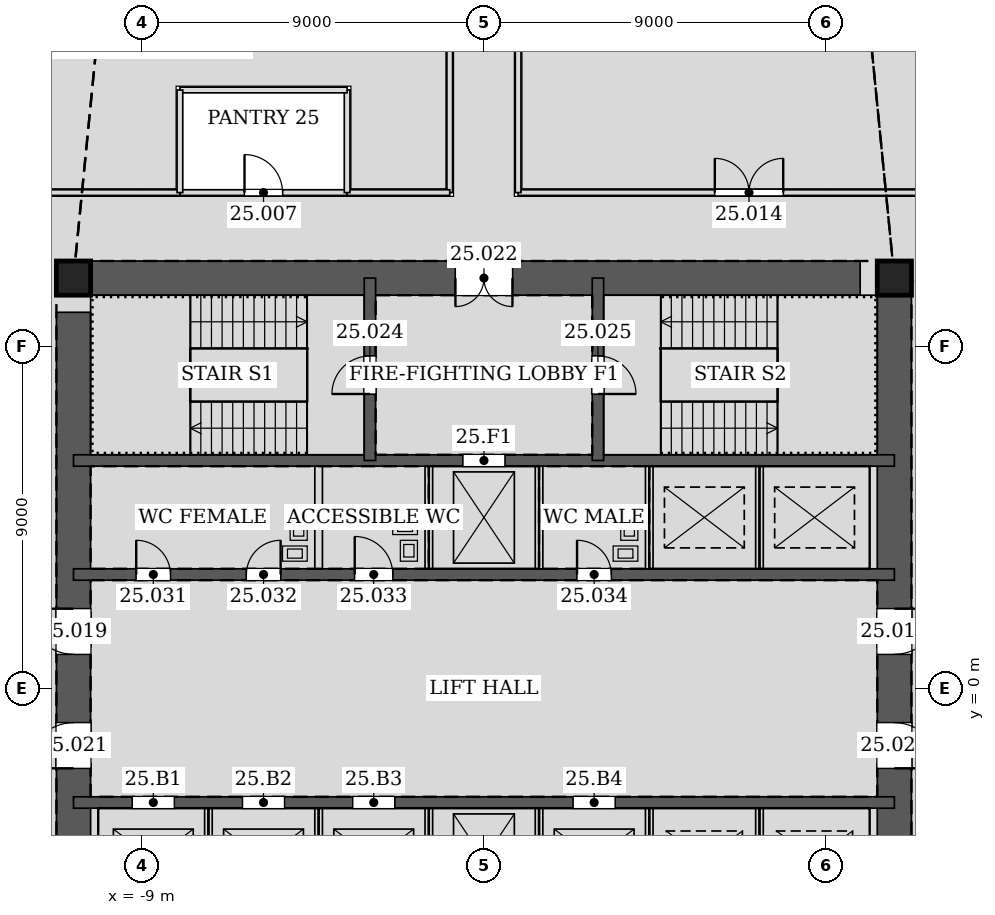
"""IFC4 building model, lengths in metres.
Left out: names, types, materials, properties, quantities, classifications, styles, units other than length and angle.
Written with IfcOpenShell. Run it as: python <this file> out.ifc"""

import sys

from ifc_helpers import new_model, si_unit, direction, frame, frame_2d, origin, origin_2d, place, context, subcontext, project, spatial, rectangle, hollow_rectangle, extrude, element, fill, save


model = new_model("IFC4")
c1 = context("Model", 3, precision=1e-05, world=origin(), true_north=direction((0.0, 1.0)))
c2 = subcontext(c1, "Body", "Model", "MODEL_VIEW")
j1 = project(units=[si_unit("LENGTHUNIT", "METRE"), si_unit("PLANEANGLEUNIT", "RADIAN")], contexts=[c1])
p1 = place(None, origin())
s1 = spatial("IfcSite", under=j1, at=p1, CompositionType="ELEMENT")
p2 = place(p1, origin())
s2 = spatial("IfcBuilding", under=s1, at=p2, CompositionType="ELEMENT")
p3 = place(p2, frame((0.0, 0.0, 113.4)))
s3 = spatial("IfcBuildingStorey", under=s2, at=p3, CompositionType="ELEMENT", Elevation=113.4)
for number, where, z_axis, x_axis in (
    (1, (10.8, 10.8, 0.0), (0.0, 0.0, 1.0), (1.0, 0.0, 0.0)),
    (2, (-10.8, 10.8, 0.0), (0.0, 0.0, 1.0), (1.0, 0.0, 0.0)),
):
    element("IfcColumn", number, at=place(p3, frame(where, z_axis=z_axis, x_axis=x_axis)), inside=s3, PredefinedType="COLUMN", context=c2, shape_type="SweptSolid", body=[
        extrude(hollow_rectangle(XDim=0.9, YDim=0.9, WallThickness=0.06, at=origin_2d()), origin(), (0.0, 0.0, 1.0), 4.2),
    ])
p4 = place(p3, frame((10.8, -10.8, 0.0), z_axis=(0.0, 0.0, 1.0), x_axis=(0.0, 1.0, 0.0)))
e3 = element("IfcWall", 3, at=p4, inside=s3, PredefinedType="SOLIDWALL", context=c2, shape_type="SweptSolid", body=[
    extrude(rectangle(XDim=21.6, YDim=0.9, at=frame_2d((10.8, 0.0))), origin(), (0.0, 0.0, 1.0), 4.2),
])
p5 = place(p4, frame((11.7, 0.0, 0.0)))
e4 = element("IfcOpeningElement", 4, at=p5, cuts=e3, PredefinedType="OPENING", context=c2, shape_type="SweptSolid", body=[
    extrude(rectangle(XDim=1.2, YDim=2.1, at=frame_2d((0.6, 1.05))), frame((0.0, 0.46, 0.0), z_axis=(0.0, -1.0, 0.0), x_axis=(1.0, 0.0, 0.0)), (0.0, 0.0, 1.0), 0.92),
])
p6 = place(p4, frame((8.7, 0.0, 0.0)))
e5 = element("IfcOpeningElement", 5, at=p6, cuts=e3, PredefinedType="OPENING", context=c2, shape_type="SweptSolid", body=[
    extrude(rectangle(XDim=1.2, YDim=2.1, at=frame_2d((0.6, 1.05))), frame((0.0, 0.46, 0.0), z_axis=(0.0, -1.0, 0.0), x_axis=(1.0, 0.0, 0.0)), (0.0, 0.0, 1.0), 0.92),
])
p7 = place(p3, frame((10.8, 10.8, 0.0), z_axis=(0.0, 0.0, 1.0), x_axis=(-1.0, 0.0, 0.0)))
e6 = element("IfcWall", 6, at=p7, inside=s3, PredefinedType="SOLIDWALL", context=c2, shape_type="SweptSolid", body=[
    extrude(rectangle(XDim=21.6, YDim=0.9, at=frame_2d((10.8, 0.0))), origin(), (0.0, 0.0, 1.0), 4.2),
])
p8 = place(p7, frame((10.05, 0.0, 0.0)))
e7 = element("IfcOpeningElement", 7, at=p8, cuts=e6, PredefinedType="OPENING", context=c2, shape_type="SweptSolid", body=[
    extrude(rectangle(XDim=1.5, YDim=2.1, at=frame_2d((0.75, 1.05))), frame((0.0, 0.46, 0.0), z_axis=(0.0, -1.0, 0.0), x_axis=(1.0, 0.0, 0.0)), (0.0, 0.0, 1.0), 0.92),
])
p9 = place(p3, frame((-10.8, 10.8, 0.0), z_axis=(0.0, 0.0, 1.0), x_axis=(0.0, -1.0, 0.0)))
e8 = element("IfcWall", 8, at=p9, inside=s3, PredefinedType="SOLIDWALL", context=c2, shape_type="SweptSolid", body=[
    extrude(rectangle(XDim=21.6, YDim=0.9, at=frame_2d((10.8, 0.0))), origin(), (0.0, 0.0, 1.0), 4.2),
])
p10 = place(p9, frame((8.7, 0.0, 0.0)))
e9 = element("IfcOpeningElement", 9, at=p10, cuts=e8, PredefinedType="OPENING", context=c2, shape_type="SweptSolid", body=[
    extrude(rectangle(XDim=1.2, YDim=2.1, at=frame_2d((0.6, 1.05))), frame((0.0, 0.46, 0.0), z_axis=(0.0, -1.0, 0.0), x_axis=(1.0, 0.0, 0.0)), (0.0, 0.0, 1.0), 0.92),
])
p11 = place(p9, frame((11.7, 0.0, 0.0)))
e10 = element("IfcOpeningElement", 10, at=p11, cuts=e8, PredefinedType="OPENING", context=c2, shape_type="SweptSolid", body=[
    extrude(rectangle(XDim=1.2, YDim=2.1, at=frame_2d((0.6, 1.05))), frame((0.0, 0.46, 0.0), z_axis=(0.0, -1.0, 0.0), x_axis=(1.0, 0.0, 0.0)), (0.0, 0.0, 1.0), 0.92),
])
p12 = place(p3, frame((-10.8, 3.0, 0.0), z_axis=(0.0, 0.0, 1.0), x_axis=(1.0, 0.0, 0.0)))
e11 = element("IfcWall", 11, at=p12, inside=s3, PredefinedType="SOLIDWALL", context=c2, shape_type="SweptSolid", body=[
    extrude(rectangle(XDim=21.6, YDim=0.3, at=frame_2d((10.8, 0.0))), origin(), (0.0, 0.0, 1.0), 4.2),
])
p13 = place(p12, frame((1.65, 0.0, 0.0)))
e12 = element("IfcOpeningElement", 12, at=p13, cuts=e11, PredefinedType="OPENING", context=c2, shape_type="SweptSolid", body=[
    extrude(rectangle(XDim=0.9, YDim=2.1, at=frame_2d((0.45, 1.05))), frame((0.0, 0.16, 0.0), z_axis=(0.0, -1.0, 0.0), x_axis=(1.0, 0.0, 0.0)), (0.0, 0.0, 1.0), 0.32),
])
p14 = place(p12, frame((4.55, 0.0, 0.0)))
e13 = element("IfcOpeningElement", 13, at=p14, cuts=e11, PredefinedType="OPENING", context=c2, shape_type="SweptSolid", body=[
    extrude(rectangle(XDim=0.9, YDim=2.1, at=frame_2d((0.45, 1.05))), frame((0.0, 0.16, 0.0), z_axis=(0.0, -1.0, 0.0), x_axis=(1.0, 0.0, 0.0)), (0.0, 0.0, 1.0), 0.32),
])
p15 = place(p12, frame((7.4, 0.0, 0.0)))
e14 = element("IfcOpeningElement", 14, at=p15, cuts=e11, PredefinedType="OPENING", context=c2, shape_type="SweptSolid", body=[
    extrude(rectangle(XDim=1.0, YDim=2.1, at=frame_2d((0.5, 1.05))), frame((0.0, 0.16, 0.0), z_axis=(0.0, -1.0, 0.0), x_axis=(1.0, 0.0, 0.0)), (0.0, 0.0, 1.0), 0.32),
])
p16 = place(p12, frame((13.25, 0.0, 0.0)))
e15 = element("IfcOpeningElement", 15, at=p16, cuts=e11, PredefinedType="OPENING", context=c2, shape_type="SweptSolid", body=[
    extrude(rectangle(XDim=0.9, YDim=2.1, at=frame_2d((0.45, 1.05))), frame((0.0, 0.16, 0.0), z_axis=(0.0, -1.0, 0.0), x_axis=(1.0, 0.0, 0.0)), (0.0, 0.0, 1.0), 0.32),
])
p17 = place(p3, frame((-10.8, 6.0, 0.0), z_axis=(0.0, 0.0, 1.0), x_axis=(1.0, 0.0, 0.0)))
e16 = element("IfcWall", 16, at=p17, inside=s3, PredefinedType="SOLIDWALL", context=c2, shape_type="SweptSolid", body=[
    extrude(rectangle(XDim=21.6, YDim=0.3, at=frame_2d((10.8, 0.0))), origin(), (0.0, 0.0, 1.0), 4.2),
])
p18 = place(p17, frame((10.25, 0.0, 0.0)))
e17 = element("IfcOpeningElement", 17, at=p18, cuts=e16, PredefinedType="OPENING", context=c2, shape_type="SweptSolid", body=[
    extrude(rectangle(XDim=1.1, YDim=2.1, at=frame_2d((0.55, 1.05))), frame((0.0, 0.16, 0.0), z_axis=(0.0, -1.0, 0.0), x_axis=(1.0, 0.0, 0.0)), (0.0, 0.0, 1.0), 0.32),
])
p19 = place(p3, frame((-3.0, 6.0, 0.0), z_axis=(0.0, 0.0, 1.0), x_axis=(0.0, 1.0, 0.0)))
e18 = element("IfcWall", 18, at=p19, inside=s3, PredefinedType="SOLIDWALL", context=c2, shape_type="SweptSolid", body=[
    extrude(rectangle(XDim=4.8, YDim=0.3, at=frame_2d((2.4, 0.0))), origin(), (0.0, 0.0, 1.0), 4.2),
])
p20 = place(p19, frame((1.75, 0.0, 0.0)))
e19 = element("IfcOpeningElement", 19, at=p20, cuts=e18, PredefinedType="OPENING", context=c2, shape_type="SweptSolid", body=[
    extrude(rectangle(XDim=1.0, YDim=2.1, at=frame_2d((0.5, 1.05))), frame((0.0, 0.16, 0.0), z_axis=(0.0, -1.0, 0.0), x_axis=(1.0, 0.0, 0.0)), (0.0, 0.0, 1.0), 0.32),
])
p21 = place(p3, frame((3.0, 6.0, 0.0), z_axis=(0.0, 0.0, 1.0), x_axis=(0.0, 1.0, 0.0)))
e20 = element("IfcWall", 20, at=p21, inside=s3, PredefinedType="SOLIDWALL", context=c2, shape_type="SweptSolid", body=[
    extrude(rectangle(XDim=4.8, YDim=0.3, at=frame_2d((2.4, 0.0))), origin(), (0.0, 0.0, 1.0), 4.2),
])
p22 = place(p21, frame((1.75, 0.0, 0.0)))
e21 = element("IfcOpeningElement", 21, at=p22, cuts=e20, PredefinedType="OPENING", context=c2, shape_type="SweptSolid", body=[
    extrude(rectangle(XDim=1.0, YDim=2.1, at=frame_2d((0.5, 1.05))), frame((0.0, 0.16, 0.0), z_axis=(0.0, -1.0, 0.0), x_axis=(1.0, 0.0, 0.0)), (0.0, 0.0, 1.0), 0.32),
])
p23 = place(p3, frame((-10.8, -3.0, 0.0), z_axis=(0.0, 0.0, 1.0), x_axis=(1.0, 0.0, 0.0)))
e22 = element("IfcWall", 22, at=p23, inside=s3, PredefinedType="SOLIDWALL", context=c2, shape_type="SweptSolid", body=[
    extrude(rectangle(XDim=21.6, YDim=0.3, at=frame_2d((10.8, 0.0))), origin(), (0.0, 0.0, 1.0), 4.2),
])
p24 = place(p23, frame((1.55, 0.0, 0.0)))
e23 = element("IfcOpeningElement", 23, at=p24, cuts=e22, PredefinedType="OPENING", context=c2, shape_type="SweptSolid", body=[
    extrude(rectangle(XDim=1.1, YDim=2.1, at=frame_2d((0.55, 1.05))), frame((0.0, 0.16, 0.0), z_axis=(0.0, -1.0, 0.0), x_axis=(1.0, 0.0, 0.0)), (0.0, 0.0, 1.0), 0.32),
])
p25 = place(p23, frame((4.45, 0.0, 0.0)))
e24 = element("IfcOpeningElement", 24, at=p25, cuts=e22, PredefinedType="OPENING", context=c2, shape_type="SweptSolid", body=[
    extrude(rectangle(XDim=1.1, YDim=2.1, at=frame_2d((0.55, 1.05))), frame((0.0, 0.16, 0.0), z_axis=(0.0, -1.0, 0.0), x_axis=(1.0, 0.0, 0.0)), (0.0, 0.0, 1.0), 0.32),
])
p26 = place(p23, frame((7.35, 0.0, 0.0)))
e25 = element("IfcOpeningElement", 25, at=p26, cuts=e22, PredefinedType="OPENING", context=c2, shape_type="SweptSolid", body=[
    extrude(rectangle(XDim=1.1, YDim=2.1, at=frame_2d((0.55, 1.05))), frame((0.0, 0.16, 0.0), z_axis=(0.0, -1.0, 0.0), x_axis=(1.0, 0.0, 0.0)), (0.0, 0.0, 1.0), 0.32),
])
p27 = place(p23, frame((13.15, 0.0, 0.0)))
e26 = element("IfcOpeningElement", 26, at=p27, cuts=e22, PredefinedType="OPENING", context=c2, shape_type="SweptSolid", body=[
    extrude(rectangle(XDim=1.1, YDim=2.1, at=frame_2d((0.55, 1.05))), frame((0.0, 0.16, 0.0), z_axis=(0.0, -1.0, 0.0), x_axis=(1.0, 0.0, 0.0)), (0.0, 0.0, 1.0), 0.32),
])
p28 = place(p3, frame((-3.599, 13.05, 0.0), z_axis=(0.0, 0.0, 1.0), x_axis=(-1.0, 0.0, 0.0)))
e27 = element("IfcWall", 27, at=p28, inside=s3, PredefinedType="PARTITIONING", context=c2, shape_type="SweptSolid", body=[
    extrude(rectangle(XDim=4.402, YDim=0.15, at=frame_2d((2.201, 0.0))), origin(), (0.0, 0.0, 1.0), 4.035),
])
p29 = place(p28, frame((1.701, 0.0, 0.0)))
e28 = element("IfcOpeningElement", 28, at=p29, cuts=e27, PredefinedType="OPENING", context=c2, shape_type="SweptSolid", body=[
    extrude(rectangle(XDim=1.0, YDim=2.1, at=frame_2d((0.5, 1.05))), frame((0.0, 0.085, 0.0), z_axis=(0.0, -1.0, 0.0), x_axis=(1.0, 0.0, 0.0)), (0.0, 0.0, 1.0), 0.17),
])
p30 = place(p3, frame((13.05, 13.05, 0.0), z_axis=(0.0, 0.0, 1.0), x_axis=(-1.0, 0.0, 0.0)))
e29 = element("IfcWall", 29, at=p30, inside=s3, PredefinedType="PARTITIONING", context=c2, shape_type="SweptSolid", body=[
    extrude(rectangle(XDim=12.15, YDim=0.15, at=frame_2d((6.075, 0.0))), origin(), (0.0, 0.0, 1.0), 3.098),
])
p31 = place(p30, frame((5.175, 0.0, 0.0)))
e30 = element("IfcOpeningElement", 30, at=p31, cuts=e29, PredefinedType="OPENING", context=c2, shape_type="SweptSolid", body=[
    extrude(rectangle(XDim=1.8, YDim=2.4, at=frame_2d((0.9, 1.2))), frame((0.0, 0.085, 0.0), z_axis=(0.0, -1.0, 0.0), x_axis=(1.0, 0.0, 0.0)), (0.0, 0.0, 1.0), 0.17),
])
p32 = place(p3, frame((0.9, 13.05, 0.0), z_axis=(0.0, 0.0, 1.0), x_axis=(0.0, 1.0, 0.0)))
e31 = element("IfcWall", 31, at=p32, inside=s3, PredefinedType="PARTITIONING", context=c2, shape_type="SweptSolid", body=[
    extrude(rectangle(XDim=5.808, YDim=0.15, at=frame_2d((2.904, 0.0))), origin(), (0.0, 0.0, 1.0), 3.426),
])
p33 = place(p3, frame((-7.999, 13.05, 0.0), z_axis=(0.0, 0.0, 1.0), x_axis=(-1.0, 0.0, 0.0)))
e32 = element("IfcWall", 32, at=p33, inside=s3, PredefinedType="PARTITIONING", context=c2, shape_type="SweptSolid", body=[
    extrude(rectangle(XDim=5.051, YDim=0.15, at=frame_2d((2.525, 0.0))), origin(), (0.0, 0.0, 1.0), 3.098),
])
p34 = place(p3, frame((-0.9, 19.858, 0.0), z_axis=(0.0, 0.0, 1.0), x_axis=(0.0, -1.0, 0.0)))
e33 = element("IfcWall", 33, at=p34, inside=s3, PredefinedType="PARTITIONING", context=c2, shape_type="SweptSolid", body=[
    extrude(rectangle(XDim=6.808, YDim=0.15, at=frame_2d((3.404, 0.0))), origin(), (0.0, 0.0, 1.0), 3.426),
])
p35 = place(p3, frame((-0.9, 13.05, 0.0), z_axis=(0.0, 0.0, 1.0), x_axis=(-1.0, 0.0, 0.0)))
e34 = element("IfcWall", 34, at=p35, inside=s3, PredefinedType="PARTITIONING", context=c2, shape_type="SweptSolid", body=[
    extrude(rectangle(XDim=2.701, YDim=0.15, at=frame_2d((1.351, 0.0))), origin(), (0.0, 0.0, 1.0), 4.035),
])
p36 = place(p3, frame((-3.6, 13.05, 0.0), z_axis=(0.0, 0.0, 1.0), x_axis=(0.0, 1.0, 0.0)))
e35 = element("IfcWall", 35, at=p36, inside=s3, PredefinedType="PARTITIONING", context=c2, shape_type="SweptSolid", body=[
    extrude(rectangle(XDim=2.7, YDim=0.15, at=frame_2d((1.35, 0.0))), origin(), (0.0, 0.0, 1.0), 3.426),
])
p37 = place(p3, frame((-3.6, 15.75, 0.0), z_axis=(0.0, 0.0, 1.0), x_axis=(-1.0, 0.0, 0.0)))
e36 = element("IfcWall", 36, at=p37, inside=s3, PredefinedType="PARTITIONING", context=c2, shape_type="SweptSolid", body=[
    extrude(rectangle(XDim=4.4, YDim=0.15, at=frame_2d((2.2, 0.0))), origin(), (0.0, 0.0, 1.0), 4.035),
])
p38 = place(p3, frame((-8.0, 15.75, 0.0), z_axis=(0.0, 0.0, 1.0), x_axis=(0.0, -1.0, 0.0)))
e37 = element("IfcWall", 37, at=p38, inside=s3, PredefinedType="PARTITIONING", context=c2, shape_type="SweptSolid", body=[
    extrude(rectangle(XDim=2.7, YDim=0.15, at=frame_2d((1.35, 0.0))), origin(), (0.0, 0.0, 1.0), 3.426),
])
for number, where, z_axis, x_axis in (
    (38, (-4.35, 3.15, 0.0), (0.0, 0.0, 1.0), (0.0, 1.0, 0.0)),
    (39, (-1.45, 3.15, 0.0), (0.0, 0.0, 1.0), (0.0, 1.0, 0.0)),
    (40, (1.45, 3.15, 0.0), (0.0, 0.0, 1.0), (0.0, 1.0, 0.0)),
    (41, (4.35, 3.15, 0.0), (0.0, 0.0, 1.0), (0.0, 1.0, 0.0)),
):
    element("IfcWall", number, at=place(p3, frame(where, z_axis=z_axis, x_axis=x_axis)), inside=s3, PredefinedType="PARTITIONING", context=c2, shape_type="SweptSolid", body=[
        extrude(rectangle(XDim=2.7, YDim=0.2, at=frame_2d((1.35, 0.0))), origin(), (0.0, 0.0, 1.0), 4.035),
    ])
for number, where, z_axis, x_axis in (
    (42, (7.25, 3.15, 0.0), (0.0, 0.0, 1.0), (0.0, 1.0, 0.0)),
    (43, (-7.25, -5.85, 0.0), (0.0, 0.0, 1.0), (0.0, 1.0, 0.0)),
    (44, (-4.35, -5.85, 0.0), (0.0, 0.0, 1.0), (0.0, 1.0, 0.0)),
    (45, (-1.45, -5.85, 0.0), (0.0, 0.0, 1.0), (0.0, 1.0, 0.0)),
    (46, (1.45, -5.85, 0.0), (0.0, 0.0, 1.0), (0.0, 1.0, 0.0)),
    (47, (4.35, -5.85, 0.0), (0.0, 0.0, 1.0), (0.0, 1.0, 0.0)),
    (48, (7.25, -5.85, 0.0), (0.0, 0.0, 1.0), (0.0, 1.0, 0.0)),
):
    element("IfcWall", number, at=place(p3, frame(where, z_axis=z_axis, x_axis=x_axis)), inside=s3, PredefinedType="PARTITIONING", context=c2, shape_type="SweptSolid", body=[
        extrude(rectangle(XDim=2.7, YDim=0.2, at=frame_2d((1.35, 0.0))), origin(), (0.0, 0.0, 1.0), 4.2),
    ])
p39 = place(p29, frame((1.0, 0.0, 0.0), z_axis=(0.0, 0.0, 1.0), x_axis=(-1.0, 0.0, 0.0)))
e49 = element("IfcDoor", 49, at=p39, inside=s3, OperationType="SINGLE_SWING_LEFT", PredefinedType="DOOR", context=c2, shape_type="SweptSolid", body=[
    extrude(rectangle(XDim=1.0, YDim=2.1, at=frame_2d((0.5, 1.05))), frame((0.0, 0.025, 0.0), z_axis=(0.0, -1.0, 0.0), x_axis=(1.0, 0.0, 0.0)), (0.0, 0.0, 1.0), 0.05),
])
fill(e28, e49)
p40 = place(p31, frame((1.8, 0.0, 0.0), z_axis=(0.0, 0.0, 1.0), x_axis=(-1.0, 0.0, 0.0)))
e50 = element("IfcDoor", 50, at=p40, inside=s3, OperationType="DOUBLE_DOOR_SINGLE_SWING", PredefinedType="DOOR", context=c2, shape_type="SweptSolid", body=[
    extrude(rectangle(XDim=1.8, YDim=2.4, at=frame_2d((0.9, 1.2))), frame((0.0, 0.025, 0.0), z_axis=(0.0, -1.0, 0.0), x_axis=(1.0, 0.0, 0.0)), (0.0, 0.0, 1.0), 0.05),
])
fill(e30, e50)
p41 = place(p5, frame((1.2, 0.0, 0.0), z_axis=(0.0, 0.0, 1.0), x_axis=(-1.0, 0.0, 0.0)))
e51 = element("IfcDoor", 51, at=p41, inside=s3, OperationType="SINGLE_SWING_LEFT", PredefinedType="DOOR", context=c2, shape_type="SweptSolid", body=[
    extrude(rectangle(XDim=1.2, YDim=2.1, at=frame_2d((0.6, 1.05))), frame((0.0, 0.025, 0.0), z_axis=(0.0, -1.0, 0.0), x_axis=(1.0, 0.0, 0.0)), (0.0, 0.0, 1.0), 0.05),
])
fill(e4, e51)
p42 = place(p10, frame((1.2, 0.0, 0.0), z_axis=(0.0, 0.0, 1.0), x_axis=(-1.0, 0.0, 0.0)))
e52 = element("IfcDoor", 52, at=p42, inside=s3, OperationType="SINGLE_SWING_RIGHT", PredefinedType="DOOR", context=c2, shape_type="SweptSolid", body=[
    extrude(rectangle(XDim=1.2, YDim=2.1, at=frame_2d((0.6, 1.05))), frame((0.0, 0.025, 0.0), z_axis=(0.0, -1.0, 0.0), x_axis=(1.0, 0.0, 0.0)), (0.0, 0.0, 1.0), 0.05),
])
fill(e9, e52)
p43 = place(p6, frame((1.2, 0.0, 0.0), z_axis=(0.0, 0.0, 1.0), x_axis=(-1.0, 0.0, 0.0)))
e53 = element("IfcDoor", 53, at=p43, inside=s3, OperationType="SINGLE_SWING_RIGHT", PredefinedType="DOOR", context=c2, shape_type="SweptSolid", body=[
    extrude(rectangle(XDim=1.2, YDim=2.1, at=frame_2d((0.6, 1.05))), frame((0.0, 0.025, 0.0), z_axis=(0.0, -1.0, 0.0), x_axis=(1.0, 0.0, 0.0)), (0.0, 0.0, 1.0), 0.05),
])
fill(e5, e53)
p44 = place(p11, frame((1.2, 0.0, 0.0), z_axis=(0.0, 0.0, 1.0), x_axis=(-1.0, 0.0, 0.0)))
e54 = element("IfcDoor", 54, at=p44, inside=s3, OperationType="SINGLE_SWING_LEFT", PredefinedType="DOOR", context=c2, shape_type="SweptSolid", body=[
    extrude(rectangle(XDim=1.2, YDim=2.1, at=frame_2d((0.6, 1.05))), frame((0.0, 0.025, 0.0), z_axis=(0.0, -1.0, 0.0), x_axis=(1.0, 0.0, 0.0)), (0.0, 0.0, 1.0), 0.05),
])
fill(e10, e54)
p45 = place(p8, origin())
e55 = element("IfcDoor", 55, at=p45, inside=s3, OperationType="DOUBLE_DOOR_SINGLE_SWING", PredefinedType="DOOR", context=c2, shape_type="SweptSolid", body=[
    extrude(rectangle(XDim=1.5, YDim=2.1, at=frame_2d((0.75, 1.05))), frame((0.0, 0.025, 0.0), z_axis=(0.0, -1.0, 0.0), x_axis=(1.0, 0.0, 0.0)), (0.0, 0.0, 1.0), 0.05),
])
fill(e7, e55)
p46 = place(p20, origin())
e56 = element("IfcDoor", 56, at=p46, inside=s3, OperationType="SINGLE_SWING_LEFT", PredefinedType="DOOR", context=c2, shape_type="SweptSolid", body=[
    extrude(rectangle(XDim=1.0, YDim=2.1, at=frame_2d((0.5, 1.05))), frame((0.0, 0.025, 0.0), z_axis=(0.0, -1.0, 0.0), x_axis=(1.0, 0.0, 0.0)), (0.0, 0.0, 1.0), 0.05),
])
fill(e19, e56)
p47 = place(p22, frame((1.0, 0.0, 0.0), z_axis=(0.0, 0.0, 1.0), x_axis=(-1.0, 0.0, 0.0)))
e57 = element("IfcDoor", 57, at=p47, inside=s3, OperationType="SINGLE_SWING_RIGHT", PredefinedType="DOOR", context=c2, shape_type="SweptSolid", body=[
    extrude(rectangle(XDim=1.0, YDim=2.1, at=frame_2d((0.5, 1.05))), frame((0.0, 0.025, 0.0), z_axis=(0.0, -1.0, 0.0), x_axis=(1.0, 0.0, 0.0)), (0.0, 0.0, 1.0), 0.05),
])
fill(e21, e57)
p48 = place(p13, origin())
e58 = element("IfcDoor", 58, at=p48, inside=s3, OperationType="SINGLE_SWING_LEFT", PredefinedType="DOOR", context=c2, shape_type="SweptSolid", body=[
    extrude(rectangle(XDim=0.9, YDim=2.1, at=frame_2d((0.45, 1.05))), frame((0.0, 0.025, 0.0), z_axis=(0.0, -1.0, 0.0), x_axis=(1.0, 0.0, 0.0)), (0.0, 0.0, 1.0), 0.05),
])
fill(e12, e58)
p49 = place(p14, origin())
e59 = element("IfcDoor", 59, at=p49, inside=s3, OperationType="SINGLE_SWING_RIGHT", PredefinedType="DOOR", context=c2, shape_type="SweptSolid", body=[
    extrude(rectangle(XDim=0.9, YDim=2.1, at=frame_2d((0.45, 1.05))), frame((0.0, 0.025, 0.0), z_axis=(0.0, -1.0, 0.0), x_axis=(1.0, 0.0, 0.0)), (0.0, 0.0, 1.0), 0.05),
])
fill(e13, e59)
p50 = place(p15, origin())
e60 = element("IfcDoor", 60, at=p50, inside=s3, OperationType="SINGLE_SWING_LEFT", PredefinedType="DOOR", context=c2, shape_type="SweptSolid", body=[
    extrude(rectangle(XDim=1.0, YDim=2.1, at=frame_2d((0.5, 1.05))), frame((0.0, 0.025, 0.0), z_axis=(0.0, -1.0, 0.0), x_axis=(1.0, 0.0, 0.0)), (0.0, 0.0, 1.0), 0.05),
])
fill(e14, e60)
p51 = place(p16, origin())
e61 = element("IfcDoor", 61, at=p51, inside=s3, OperationType="SINGLE_SWING_LEFT", PredefinedType="DOOR", context=c2, shape_type="SweptSolid", body=[
    extrude(rectangle(XDim=0.9, YDim=2.1, at=frame_2d((0.45, 1.05))), frame((0.0, 0.025, 0.0), z_axis=(0.0, -1.0, 0.0), x_axis=(1.0, 0.0, 0.0)), (0.0, 0.0, 1.0), 0.05),
])
fill(e15, e61)
p52 = place(p18, origin())
e62 = element("IfcDoor", 62, at=p52, inside=s3, OperationType="DOUBLE_DOOR_SLIDING", PredefinedType="DOOR", context=c2, shape_type="SweptSolid", body=[
    extrude(rectangle(XDim=1.1, YDim=2.1, at=frame_2d((0.55, 1.05))), frame((0.0, 0.025, 0.0), z_axis=(0.0, -1.0, 0.0), x_axis=(1.0, 0.0, 0.0)), (0.0, 0.0, 1.0), 0.05),
])
fill(e17, e62)
p53 = place(p24, origin())
e63 = element("IfcDoor", 63, at=p53, inside=s3, OperationType="DOUBLE_DOOR_SLIDING", PredefinedType="DOOR", context=c2, shape_type="SweptSolid", body=[
    extrude(rectangle(XDim=1.1, YDim=2.1, at=frame_2d((0.55, 1.05))), frame((0.0, 0.025, 0.0), z_axis=(0.0, -1.0, 0.0), x_axis=(1.0, 0.0, 0.0)), (0.0, 0.0, 1.0), 0.05),
])
fill(e23, e63)
p54 = place(p25, origin())
e64 = element("IfcDoor", 64, at=p54, inside=s3, OperationType="DOUBLE_DOOR_SLIDING", PredefinedType="DOOR", context=c2, shape_type="SweptSolid", body=[
    extrude(rectangle(XDim=1.1, YDim=2.1, at=frame_2d((0.55, 1.05))), frame((0.0, 0.025, 0.0), z_axis=(0.0, -1.0, 0.0), x_axis=(1.0, 0.0, 0.0)), (0.0, 0.0, 1.0), 0.05),
])
fill(e24, e64)
p55 = place(p26, origin())
e65 = element("IfcDoor", 65, at=p55, inside=s3, OperationType="DOUBLE_DOOR_SLIDING", PredefinedType="DOOR", context=c2, shape_type="SweptSolid", body=[
    extrude(rectangle(XDim=1.1, YDim=2.1, at=frame_2d((0.55, 1.05))), frame((0.0, 0.025, 0.0), z_axis=(0.0, -1.0, 0.0), x_axis=(1.0, 0.0, 0.0)), (0.0, 0.0, 1.0), 0.05),
])
fill(e25, e65)
p56 = place(p27, origin())
e66 = element("IfcDoor", 66, at=p56, inside=s3, OperationType="DOUBLE_DOOR_SLIDING", PredefinedType="DOOR", context=c2, shape_type="SweptSolid", body=[
    extrude(rectangle(XDim=1.1, YDim=2.1, at=frame_2d((0.55, 1.05))), frame((0.0, 0.025, 0.0), z_axis=(0.0, -1.0, 0.0), x_axis=(1.0, 0.0, 0.0)), (0.0, 0.0, 1.0), 0.05),
])
fill(e26, e66)
save(model, sys.argv[1])
